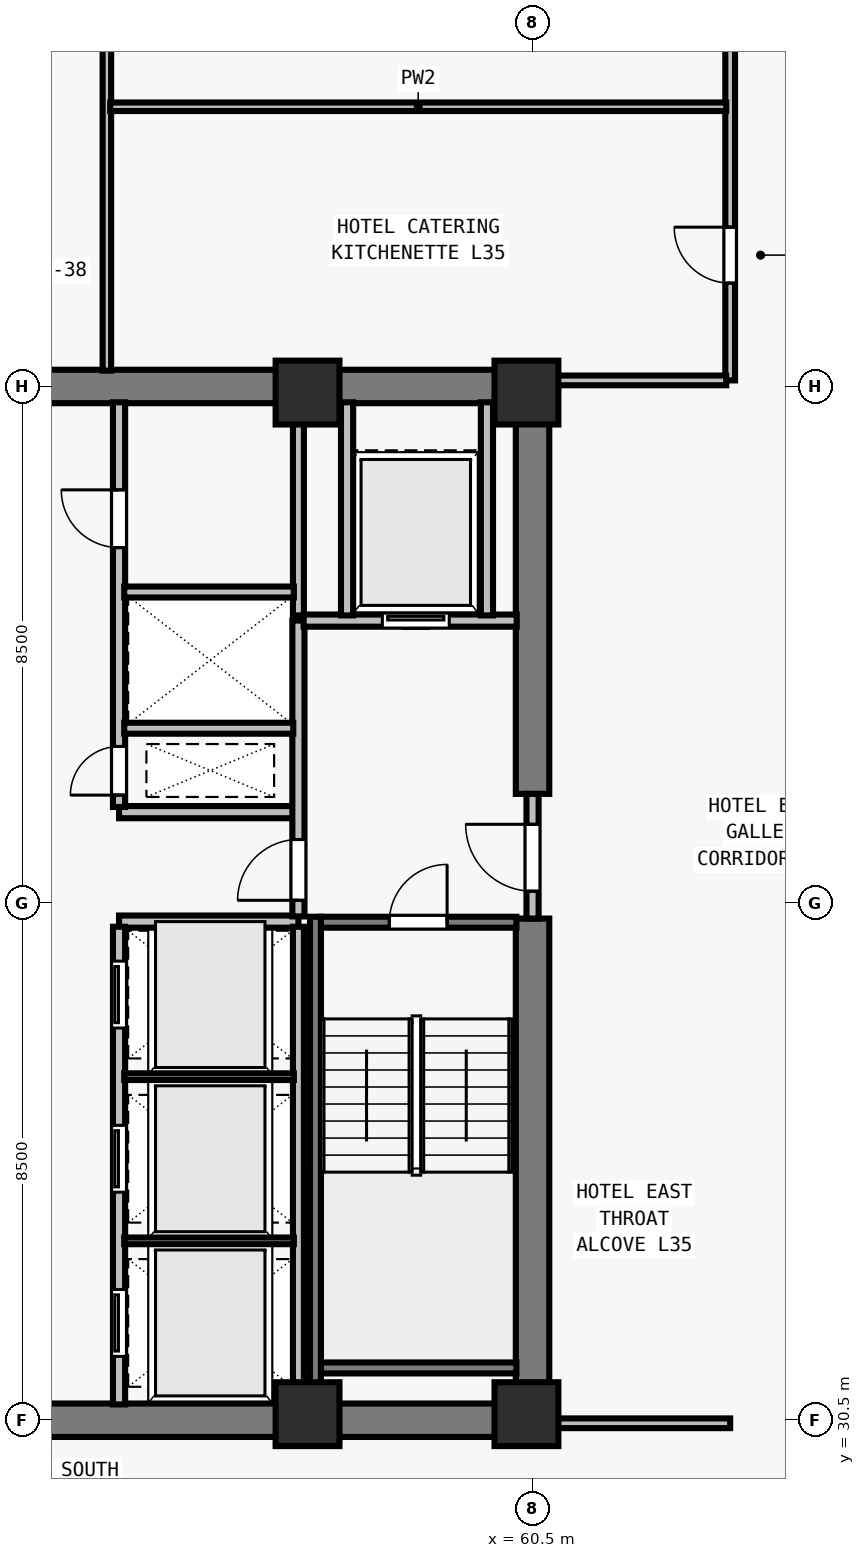
"""IFC4 building model, lengths in metres.
Left out: names, types, materials, properties, quantities, classifications, styles, units other than length and angle.
Written with IfcOpenShell. Run it as: python <this file> out.ifc"""

import sys

from ifc_helpers import new_model, si_unit, direction, frame, frame_2d, origin, origin_2d, place, context, subcontext, project, spatial, rectangle, extrude, element, fill, save


model = new_model("IFC4")
c1 = context("Model", 3, precision=1e-05, world=origin(), true_north=direction((0.0, 1.0)))
c2 = subcontext(c1, "Body", "Model", "MODEL_VIEW")
j1 = project(units=[si_unit("LENGTHUNIT", "METRE"), si_unit("PLANEANGLEUNIT", "RADIAN")], contexts=[c1])
p1 = place(None, origin())
s1 = spatial("IfcSite", under=j1, at=p1, CompositionType="ELEMENT")
p2 = place(p1, origin())
s2 = spatial("IfcBuilding", under=s1, at=p2, CompositionType="ELEMENT")
p3 = place(p2, frame((0.0, 0.0, 130.5)))
s3 = spatial("IfcBuildingStorey", under=s2, at=p3, CompositionType="ELEMENT", Elevation=130.5)
for number, where, z_axis, x_axis in (
    (1, (56.8, 30.6, 0.0), (0.0, 0.0, 1.0), (1.0, 0.0, 0.0)),
    (2, (60.4, 30.6, 0.0), (0.0, 0.0, 1.0), (1.0, 0.0, 0.0)),
    (3, (56.8, 47.4, 0.0), (0.0, 0.0, 1.0), (1.0, 0.0, 0.0)),
    (4, (60.4, 47.4, 0.0), (0.0, 0.0, 1.0), (1.0, 0.0, 0.0)),
):
    element("IfcColumn", number, at=place(p3, frame(where, z_axis=z_axis, x_axis=x_axis)), inside=s3, PredefinedType="COLUMN", context=c2, shape_type="SweptSolid", body=[
        extrude(rectangle(XDim=1.05, YDim=1.05, at=origin_2d()), origin(), (0.0, 0.0, 1.0), 3.5),
    ])
for number, where, z_axis, x_axis in (
    (5, (43.225, 30.5, 0.0), (0.0, 0.0, 1.0), (1.0, 0.0, 0.0)),
    (6, (43.225, 47.5, 0.0), (0.0, 0.0, 1.0), (1.0, 0.0, 0.0)),
):
    element("IfcWall", number, at=place(p3, frame(where, z_axis=z_axis, x_axis=x_axis)), inside=s3, PredefinedType="SHEAR", context=c2, shape_type="SweptSolid", body=[
        extrude(rectangle(XDim=17.55, YDim=0.55, at=frame_2d((8.775, 0.0))), origin(), (0.0, 0.0, 1.0), 3.28),
    ])
p4 = place(p3, frame((60.5, 30.765, 0.0), z_axis=(0.0, 0.0, 1.0), x_axis=(0.0, 1.0, 0.0)))
e7 = element("IfcWall", 7, at=p4, inside=s3, PredefinedType="SHEAR", context=c2, shape_type="SweptSolid", body=[
    extrude(rectangle(XDim=7.985, YDim=0.55, at=frame_2d((3.993, 0.0))), origin(), (0.0, 0.0, 1.0), 3.28),
])
p5 = place(p3, frame((60.5, 40.8, 0.0), z_axis=(0.0, 0.0, 1.0), x_axis=(0.0, 1.0, 0.0)))
e8 = element("IfcWall", 8, at=p5, inside=s3, PredefinedType="SHEAR", context=c2, shape_type="SweptSolid", body=[
    extrude(rectangle(XDim=6.435, YDim=0.55, at=frame_2d((3.218, 0.0))), origin(), (0.0, 0.0, 1.0), 3.28),
])
for number, where, z_axis, x_axis in (
    (9, (53.7, 38.7, 0.0), (0.0, 0.0, 1.0), (1.0, 0.0, 0.0)),
    (10, (53.7, 40.5, 0.0), (0.0, 0.0, 1.0), (1.0, 0.0, 0.0)),
):
    element("IfcWall", number, at=place(p3, frame(where, z_axis=z_axis, x_axis=x_axis)), inside=s3, PredefinedType="SOLIDWALL", context=c2, shape_type="SweptSolid", body=[
        extrude(rectangle(XDim=2.95, YDim=0.2, at=frame_2d((1.475, 0.0))), origin(), (0.0, 0.0, 1.0), 3.28),
    ])
p6 = place(p3, frame((53.7, 30.76, 0.0), z_axis=(0.0, 0.0, 1.0), x_axis=(0.0, 1.0, 0.0)))
e11 = element("IfcWall", 11, at=p6, inside=s3, PredefinedType="SOLIDWALL", context=c2, shape_type="SweptSolid", body=[
    extrude(rectangle(XDim=7.855, YDim=0.2, at=frame_2d((3.927, 0.0))), origin(), (0.0, 0.0, 1.0), 3.28),
])
p7 = place(p6, frame((0.79, 0.0, 0.0)))
e12 = element("IfcOpeningElement", 12, at=p7, cuts=e11, PredefinedType="OPENING", context=c2, shape_type="SweptSolid", body=[
    extrude(rectangle(XDim=1.1, YDim=2.2, at=frame_2d((0.55, 1.1))), frame((0.0, 0.11, 0.0), z_axis=(0.0, -1.0, 0.0), x_axis=(1.0, 0.0, 0.0)), (0.0, 0.0, 1.0), 0.22),
])
p8 = place(p6, frame((3.49, 0.0, 0.0)))
e13 = element("IfcOpeningElement", 13, at=p8, cuts=e11, PredefinedType="OPENING", context=c2, shape_type="SweptSolid", body=[
    extrude(rectangle(XDim=1.1, YDim=2.2, at=frame_2d((0.55, 1.1))), frame((0.0, 0.11, 0.0), z_axis=(0.0, -1.0, 0.0), x_axis=(1.0, 0.0, 0.0)), (0.0, 0.0, 1.0), 0.22),
])
p9 = place(p6, frame((6.19, 0.0, 0.0)))
e14 = element("IfcOpeningElement", 14, at=p9, cuts=e11, PredefinedType="OPENING", context=c2, shape_type="SweptSolid", body=[
    extrude(rectangle(XDim=1.1, YDim=2.2, at=frame_2d((0.55, 1.1))), frame((0.0, 0.11, 0.0), z_axis=(0.0, -1.0, 0.0), x_axis=(1.0, 0.0, 0.0)), (0.0, 0.0, 1.0), 0.22),
])
p10 = place(p3, frame((53.7, 40.585, 0.0), z_axis=(0.0, 0.0, 1.0), x_axis=(0.0, 1.0, 0.0)))
e15 = element("IfcWall", 15, at=p10, inside=s3, PredefinedType="SOLIDWALL", context=c2, shape_type="SweptSolid", body=[
    extrude(rectangle(XDim=6.655, YDim=0.2, at=frame_2d((3.328, 0.0))), origin(), (0.0, 0.0, 1.0), 3.28),
])
p11 = place(p10, frame((0.195, 0.0, 0.0)))
e16 = element("IfcOpeningElement", 16, at=p11, cuts=e15, PredefinedType="OPENING", context=c2, shape_type="SweptSolid", body=[
    extrude(rectangle(XDim=0.8, YDim=2.08, at=frame_2d((0.4, 1.04))), frame((0.0, 0.11, 0.0), z_axis=(0.0, -1.0, 0.0), x_axis=(1.0, 0.0, 0.0)), (0.0, 0.0, 1.0), 0.22),
])
p12 = place(p10, frame((4.265, 0.0, 0.0)))
e17 = element("IfcOpeningElement", 17, at=p12, cuts=e15, PredefinedType="OPENING", context=c2, shape_type="SweptSolid", body=[
    extrude(rectangle(XDim=0.95, YDim=2.12, at=frame_2d((0.475, 1.06))), frame((0.0, 0.11, 0.0), z_axis=(0.0, -1.0, 0.0), x_axis=(1.0, 0.0, 0.0)), (0.0, 0.0, 1.0), 0.22),
])
p13 = place(p3, frame((60.5, 38.75, 0.0), z_axis=(0.0, 0.0, 1.0), x_axis=(0.0, 1.0, 0.0)))
e18 = element("IfcWall", 18, at=p13, inside=s3, PredefinedType="SOLIDWALL", context=c2, shape_type="SweptSolid", body=[
    extrude(rectangle(XDim=2.05, YDim=0.2, at=frame_2d((1.025, 0.0))), origin(), (0.0, 0.0, 1.0), 3.28),
])
p14 = place(p13, frame((0.45, 0.0, 0.0)))
e19 = element("IfcOpeningElement", 19, at=p14, cuts=e18, PredefinedType="OPENING", context=c2, shape_type="SweptSolid", body=[
    extrude(rectangle(XDim=1.1, YDim=2.15, at=frame_2d((0.55, 1.075))), frame((0.0, 0.11, 0.0), z_axis=(0.0, -1.0, 0.0), x_axis=(1.0, 0.0, 0.0)), (0.0, 0.0, 1.0), 0.22),
])
p15 = place(p3, frame((56.65, 38.785, 0.0), z_axis=(0.0, 0.0, 1.0), x_axis=(0.0, 1.0, 0.0)))
e20 = element("IfcWall", 20, at=p15, inside=s3, PredefinedType="SOLIDWALL", context=c2, shape_type="SweptSolid", body=[
    extrude(rectangle(XDim=4.865, YDim=0.2, at=frame_2d((2.433, 0.0))), origin(), (0.0, 0.0, 1.0), 3.28),
])
p16 = place(p15, frame((0.265, 0.0, 0.0)))
e21 = element("IfcOpeningElement", 21, at=p16, cuts=e20, PredefinedType="OPENING", context=c2, shape_type="SweptSolid", body=[
    extrude(rectangle(XDim=1.0, YDim=2.15, at=frame_2d((0.5, 1.075))), frame((0.0, 0.11, 0.0), z_axis=(0.0, -1.0, 0.0), x_axis=(1.0, 0.0, 0.0)), (0.0, 0.0, 1.0), 0.22),
])
p17 = place(p3, frame((56.735, 43.65, 0.0), z_axis=(0.0, 0.0, 1.0), x_axis=(1.0, 0.0, 0.0)))
e22 = element("IfcWall", 22, at=p17, inside=s3, PredefinedType="SOLIDWALL", context=c2, shape_type="SweptSolid", body=[
    extrude(rectangle(XDim=3.505, YDim=0.2, at=frame_2d((1.752, 0.0))), origin(), (0.0, 0.0, 1.0), 3.28),
])
p18 = place(p17, frame((1.295, 0.0, 0.0)))
e23 = element("IfcOpeningElement", 23, at=p18, cuts=e22, PredefinedType="OPENING", context=c2, shape_type="SweptSolid", body=[
    extrude(rectangle(XDim=1.1, YDim=2.2, at=frame_2d((0.55, 1.1))), frame((0.0, 0.11, 0.0), z_axis=(0.0, -1.0, 0.0), x_axis=(1.0, 0.0, 0.0)), (0.0, 0.0, 1.0), 0.22),
])
for number, where, z_axis, x_axis in (
    (24, (57.45, 43.735, 0.0), (0.0, 0.0, 1.0), (0.0, 1.0, 0.0)),
    (25, (59.75, 43.735, 0.0), (0.0, 0.0, 1.0), (0.0, 1.0, 0.0)),
):
    element("IfcWall", number, at=place(p3, frame(where, z_axis=z_axis, x_axis=x_axis)), inside=s3, PredefinedType="SOLIDWALL", context=c2, shape_type="SweptSolid", body=[
        extrude(rectangle(XDim=3.505, YDim=0.2, at=frame_2d((1.752, 0.0))), origin(), (0.0, 0.0, 1.0), 3.28),
    ])
p19 = place(p3, frame((56.65, 30.76, 0.0), z_axis=(0.0, 0.0, 1.0), x_axis=(0.0, 1.0, 0.0)))
e26 = element("IfcWall", 26, at=p19, inside=s3, PredefinedType="SOLIDWALL", context=c2, shape_type="SweptSolid", body=[
    extrude(rectangle(XDim=7.855, YDim=0.18, at=frame_2d((3.927, 0.0))), origin(), (0.0, 0.0, 1.0), 3.28),
])
for number, where, z_axis, x_axis in (
    (27, (53.785, 33.45, 0.0), (0.0, 0.0, 1.0), (1.0, 0.0, 0.0)),
    (28, (53.785, 36.15, 0.0), (0.0, 0.0, 1.0), (1.0, 0.0, 0.0)),
):
    element("IfcWall", number, at=place(p3, frame(where, z_axis=z_axis, x_axis=x_axis)), inside=s3, PredefinedType="PARTITIONING", context=c2, shape_type="SweptSolid", body=[
        extrude(rectangle(XDim=2.79, YDim=0.11, at=frame_2d((1.395, 0.0))), origin(), (0.0, 0.0, 1.0), 3.28),
    ])
p20 = place(p3, frame((56.65, 43.735, 0.0), z_axis=(0.0, 0.0, 1.0), x_axis=(0.0, 1.0, 0.0)))
e29 = element("IfcWall", 29, at=p20, inside=s3, PredefinedType="SOLIDWALL", context=c2, shape_type="SweptSolid", body=[
    extrude(rectangle(XDim=3.505, YDim=0.18, at=frame_2d((1.752, 0.0))), origin(), (0.0, 0.0, 1.0), 3.28),
])
p21 = place(p3, frame((53.785, 41.88, 0.0), z_axis=(0.0, 0.0, 1.0), x_axis=(1.0, 0.0, 0.0)))
e30 = element("IfcWall", 30, at=p21, inside=s3, PredefinedType="SOLIDWALL", context=c2, shape_type="SweptSolid", body=[
    extrude(rectangle(XDim=2.78, YDim=0.18, at=frame_2d((1.39, 0.0))), origin(), (0.0, 0.0, 1.0), 3.28),
])
p22 = place(p3, frame((53.785, 44.12, 0.0), z_axis=(0.0, 0.0, 1.0), x_axis=(1.0, 0.0, 0.0)))
e31 = element("IfcWall", 31, at=p22, inside=s3, PredefinedType="SOLIDWALL", context=c2, shape_type="SweptSolid", body=[
    extrude(rectangle(XDim=2.79, YDim=0.18, at=frame_2d((1.395, 0.0))), origin(), (0.0, 0.0, 1.0), 3.28),
])
p23 = place(p3, frame((63.75, 47.6, 0.0), z_axis=(0.0, 0.0, 1.0), x_axis=(0.0, 1.0, 0.0)))
e32 = element("IfcWall", 32, at=p23, inside=s3, PredefinedType="PARTITIONING", context=c2, shape_type="SweptSolid", body=[
    extrude(rectangle(XDim=15.075, YDim=0.16, at=frame_2d((7.538, 0.0))), origin(), (0.0, 0.0, 1.0), 2.555),
])
p24 = place(p23, frame((1.6, 0.0, 0.0)))
e33 = element("IfcOpeningElement", 33, at=p24, cuts=e32, PredefinedType="OPENING", context=c2, shape_type="SweptSolid", body=[
    extrude(rectangle(XDim=0.92, YDim=2.12, at=frame_2d((0.46, 1.06))), frame((0.0, 0.09, 0.0), z_axis=(0.0, -1.0, 0.0), x_axis=(1.0, 0.0, 0.0)), (0.0, 0.0, 1.0), 0.18),
])
p25 = place(p23, frame((6.2, 0.0, 0.0)))
e34 = element("IfcOpeningElement", 34, at=p25, cuts=e32, PredefinedType="OPENING", context=c2, shape_type="SweptSolid", body=[
    extrude(rectangle(XDim=0.96, YDim=2.12, at=frame_2d((0.48, 1.06))), frame((0.0, 0.09, 0.0), z_axis=(0.0, -1.0, 0.0), x_axis=(1.0, 0.0, 0.0)), (0.0, 0.0, 1.0), 0.18),
])
p26 = place(p3, frame((60.765, 30.45, 0.0), z_axis=(0.0, 0.0, 1.0), x_axis=(1.0, 0.0, 0.0)))
e35 = element("IfcWall", 35, at=p26, inside=s3, PredefinedType="PARTITIONING", context=c2, shape_type="SweptSolid", body=[
    extrude(rectangle(XDim=2.985, YDim=0.16, at=frame_2d((1.493, 0.0))), origin(), (0.0, 0.0, 1.0), 3.28),
])
p27 = place(p3, frame((60.765, 47.6, 0.0), z_axis=(0.0, 0.0, 1.0), x_axis=(1.0, 0.0, 0.0)))
e36 = element("IfcWall", 36, at=p27, inside=s3, PredefinedType="PARTITIONING", context=c2, shape_type="SweptSolid", body=[
    extrude(rectangle(XDim=2.92, YDim=0.16, at=frame_2d((1.46, 0.0))), origin(), (0.0, 0.0, 1.0), 3.28),
])
p28 = place(p3, frame((53.5, 47.76, 0.0), z_axis=(0.0, 0.0, 1.0), x_axis=(0.0, 1.0, 0.0)))
e37 = element("IfcWall", 37, at=p28, inside=s3, PredefinedType="PARTITIONING", context=c2, shape_type="SweptSolid", body=[
    extrude(rectangle(XDim=14.915, YDim=0.14, at=frame_2d((7.458, 0.0))), origin(), (0.0, 0.0, 1.0), 2.896),
])
p29 = place(p3, frame((53.555, 52.1, 0.0), z_axis=(0.0, 0.0, 1.0), x_axis=(1.0, 0.0, 0.0)))
e38 = element("IfcWall", 38, at=p29, inside=s3, PredefinedType="PARTITIONING", context=c2, shape_type="SweptSolid", body=[
    extrude(rectangle(XDim=10.13, YDim=0.14, at=frame_2d((5.065, 0.0))), origin(), (0.0, 0.0, 1.0), 3.28),
])
p30 = place(p3, frame((57.005, 38.69, 0.0), z_axis=(0.0, 0.0, 1.0), x_axis=(1.0, 0.0, 0.0)))
e39 = element("IfcWall", 39, at=p30, inside=s3, PredefinedType="SOLIDWALL", context=c2, shape_type="SweptSolid", body=[
    extrude(rectangle(XDim=3.23, YDim=0.18, at=frame_2d((1.615, 0.0))), origin(), (0.0, 0.0, 1.0), 3.28),
])
p31 = place(p30, frame((1.14, 0.0, 0.0)))
e40 = element("IfcOpeningElement", 40, at=p31, cuts=e39, PredefinedType="OPENING", context=c2, shape_type="SweptSolid", body=[
    extrude(rectangle(XDim=0.95, YDim=2.15, at=frame_2d((0.475, 1.075))), frame((0.0, 0.1, 0.0), z_axis=(0.0, -1.0, 0.0), x_axis=(1.0, 0.0, 0.0)), (0.0, 0.0, 1.0), 0.2),
])
p32 = place(p3, frame((57.005, 31.36, 0.0), z_axis=(0.0, 0.0, 1.0), x_axis=(1.0, 0.0, 0.0)))
e41 = element("IfcWall", 41, at=p32, inside=s3, PredefinedType="SOLIDWALL", context=c2, shape_type="SweptSolid", body=[
    extrude(rectangle(XDim=3.23, YDim=0.18, at=frame_2d((1.615, 0.0))), origin(), (0.0, 0.0, 1.0), 3.28),
])
p33 = place(p3, frame((56.93, 38.78, 0.0), z_axis=(0.0, 0.0, 1.0), x_axis=(0.0, -1.0, 0.0)))
e42 = element("IfcWall", 42, at=p33, inside=s3, PredefinedType="SOLIDWALL", context=c2, shape_type="SweptSolid", body=[
    extrude(rectangle(XDim=8.017, YDim=0.18, at=frame_2d((4.009, 0.0))), origin(), (0.0, 0.0, 1.0), 3.28),
])
p34 = place(p14, origin())
e43 = element("IfcDoor", 43, at=p34, inside=s3, OperationType="SINGLE_SWING_RIGHT", PredefinedType="DOOR", context=c2, shape_type="SweptSolid", body=[
    extrude(rectangle(XDim=1.1, YDim=2.15, at=frame_2d((0.55, 1.075))), frame((0.0, 0.025, 0.0), z_axis=(0.0, -1.0, 0.0), x_axis=(1.0, 0.0, 0.0)), (0.0, 0.0, 1.0), 0.05),
])
fill(e19, e43)
p35 = place(p16, origin())
e44 = element("IfcDoor", 44, at=p35, inside=s3, OperationType="SINGLE_SWING_LEFT", PredefinedType="DOOR", context=c2, shape_type="SweptSolid", body=[
    extrude(rectangle(XDim=1.0, YDim=2.15, at=frame_2d((0.5, 1.075))), frame((0.0, 0.025, 0.0), z_axis=(0.0, -1.0, 0.0), x_axis=(1.0, 0.0, 0.0)), (0.0, 0.0, 1.0), 0.05),
])
fill(e21, e44)
p36 = place(p18, origin())
e45 = element("IfcDoor", 45, at=p36, inside=s3, OperationType="SLIDING_TO_LEFT", PredefinedType="DOOR", context=c2, shape_type="SweptSolid", body=[
    extrude(rectangle(XDim=1.1, YDim=2.2, at=frame_2d((0.55, 1.1))), frame((0.0, 0.025, 0.0), z_axis=(0.0, -1.0, 0.0), x_axis=(1.0, 0.0, 0.0)), (0.0, 0.0, 1.0), 0.05),
])
fill(e23, e45)
p37 = place(p7, origin())
e46 = element("IfcDoor", 46, at=p37, inside=s3, OperationType="SLIDING_TO_LEFT", PredefinedType="DOOR", context=c2, shape_type="SweptSolid", body=[
    extrude(rectangle(XDim=1.1, YDim=2.2, at=frame_2d((0.55, 1.1))), frame((0.0, 0.025, 0.0), z_axis=(0.0, -1.0, 0.0), x_axis=(1.0, 0.0, 0.0)), (0.0, 0.0, 1.0), 0.05),
])
fill(e12, e46)
p38 = place(p8, origin())
e47 = element("IfcDoor", 47, at=p38, inside=s3, OperationType="SLIDING_TO_LEFT", PredefinedType="DOOR", context=c2, shape_type="SweptSolid", body=[
    extrude(rectangle(XDim=1.1, YDim=2.2, at=frame_2d((0.55, 1.1))), frame((0.0, 0.025, 0.0), z_axis=(0.0, -1.0, 0.0), x_axis=(1.0, 0.0, 0.0)), (0.0, 0.0, 1.0), 0.05),
])
fill(e13, e47)
p39 = place(p9, origin())
e48 = element("IfcDoor", 48, at=p39, inside=s3, OperationType="SLIDING_TO_LEFT", PredefinedType="DOOR", context=c2, shape_type="SweptSolid", body=[
    extrude(rectangle(XDim=1.1, YDim=2.2, at=frame_2d((0.55, 1.1))), frame((0.0, 0.025, 0.0), z_axis=(0.0, -1.0, 0.0), x_axis=(1.0, 0.0, 0.0)), (0.0, 0.0, 1.0), 0.05),
])
fill(e14, e48)
p40 = place(p11, origin())
e49 = element("IfcDoor", 49, at=p40, inside=s3, OperationType="SINGLE_SWING_LEFT", PredefinedType="DOOR", context=c2, shape_type="SweptSolid", body=[
    extrude(rectangle(XDim=0.8, YDim=2.08, at=frame_2d((0.4, 1.04))), frame((0.0, 0.025, 0.0), z_axis=(0.0, -1.0, 0.0), x_axis=(1.0, 0.0, 0.0)), (0.0, 0.0, 1.0), 0.05),
])
fill(e16, e49)
p41 = place(p12, origin())
e50 = element("IfcDoor", 50, at=p41, inside=s3, OperationType="SINGLE_SWING_RIGHT", PredefinedType="DOOR", context=c2, shape_type="SweptSolid", body=[
    extrude(rectangle(XDim=0.95, YDim=2.12, at=frame_2d((0.475, 1.06))), frame((0.0, 0.025, 0.0), z_axis=(0.0, -1.0, 0.0), x_axis=(1.0, 0.0, 0.0)), (0.0, 0.0, 1.0), 0.05),
])
fill(e17, e50)
p42 = place(p24, origin())
e51 = element("IfcDoor", 51, at=p42, inside=s3, OperationType="SINGLE_SWING_RIGHT", PredefinedType="DOOR", context=c2, shape_type="SweptSolid", body=[
    extrude(rectangle(XDim=0.92, YDim=2.12, at=frame_2d((0.46, 1.06))), frame((0.0, 0.025, 0.0), z_axis=(0.0, -1.0, 0.0), x_axis=(1.0, 0.0, 0.0)), (0.0, 0.0, 1.0), 0.05),
])
fill(e33, e51)
p43 = place(p31, origin())
e52 = element("IfcDoor", 52, at=p43, inside=s3, OperationType="SINGLE_SWING_RIGHT", PredefinedType="DOOR", context=c2, shape_type="SweptSolid", body=[
    extrude(rectangle(XDim=0.95, YDim=2.15, at=frame_2d((0.475, 1.075))), frame((0.0, 0.025, 0.0), z_axis=(0.0, -1.0, 0.0), x_axis=(1.0, 0.0, 0.0)), (0.0, 0.0, 1.0), 0.05),
])
fill(e40, e52)
save(model, sys.argv[1])
